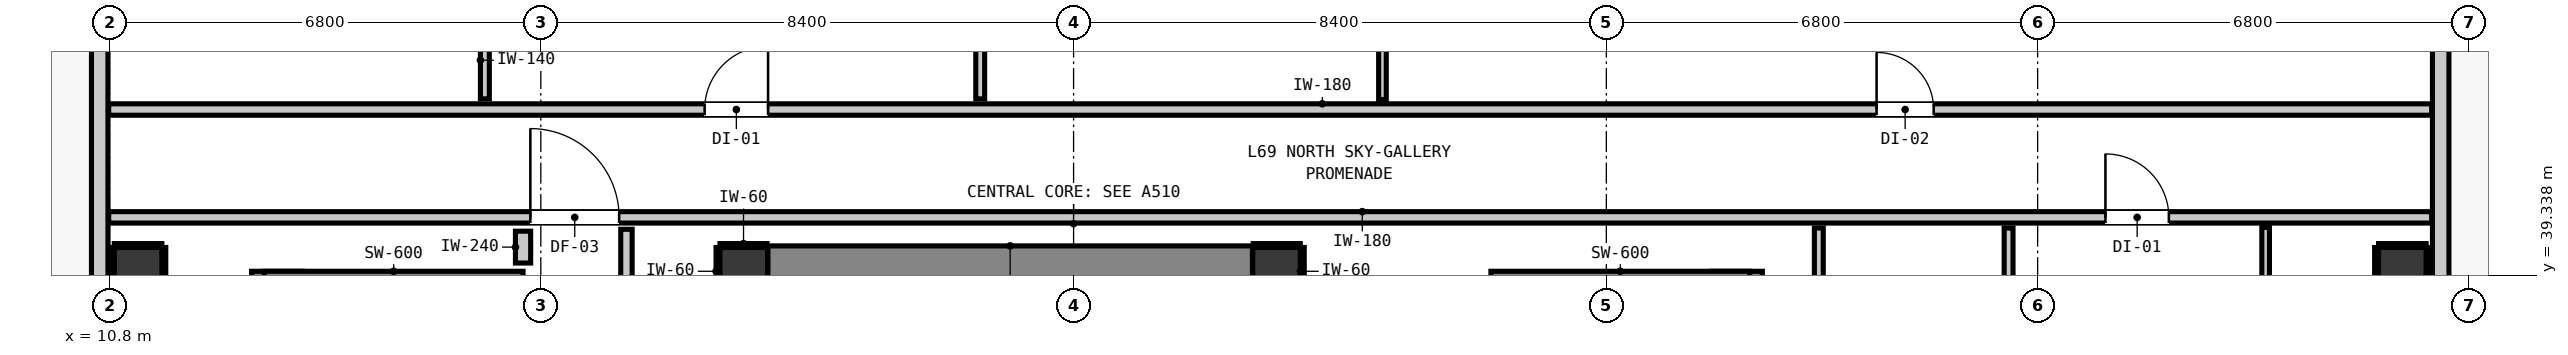
"""IFC4 building model, lengths in metres.
Left out: names, types, materials, properties, quantities, classifications, styles, units other than length and angle.
Written with IfcOpenShell. Run it as: python <this file> out.ifc"""

import sys

from ifc_helpers import new_model, si_unit, direction, frame, frame_2d, origin, origin_2d, place, context, subcontext, project, spatial, rectangle, extrude, element, fill, save


model = new_model("IFC4")
c1 = context("Model", 3, precision=1e-05, world=origin(), true_north=direction((0.0, 1.0)))
c2 = subcontext(c1, "Body", "Model", "MODEL_VIEW")
j1 = project(units=[si_unit("LENGTHUNIT", "METRE"), si_unit("PLANEANGLEUNIT", "RADIAN")], contexts=[c1])
p1 = place(None, origin())
s1 = spatial("IfcSite", under=j1, at=p1, CompositionType="ELEMENT")
p2 = place(p1, origin())
s2 = spatial("IfcBuilding", under=s1, at=p2, CompositionType="ELEMENT")
p3 = place(p2, frame((0.0, 0.0, 237.92)))
s3 = spatial("IfcBuildingStorey", under=s2, at=p3, CompositionType="ELEMENT", Elevation=237.92)
for number, where, z_axis, x_axis in (
    (1, (20.8, 39.4, 0.0), (0.0, 0.0, 1.0), (1.0, 0.0, 0.0)),
    (2, (29.2, 39.4, 0.0), (0.0, 0.0, 1.0), (1.0, 0.0, 0.0)),
):
    element("IfcColumn", number, at=place(p3, frame(where, z_axis=z_axis, x_axis=x_axis)), inside=s3, PredefinedType="COLUMN", context=c2, shape_type="SweptSolid", body=[
        extrude(rectangle(XDim=0.75, YDim=0.75, at=origin_2d()), origin(), (0.0, 0.0, 1.0), 3.32),
    ])
p4 = place(p3, frame((13.44, 31.08, 0.0), z_axis=(0.0, 0.0, 1.0), x_axis=(0.0, 1.0, 0.0)))
e3 = element("IfcWall", 3, at=p4, inside=s3, PredefinedType="SHEAR", context=c2, shape_type="SweptSolid", body=[
    extrude(rectangle(XDim=8.32, YDim=0.8, at=frame_2d((4.16, 0.0))), origin(), (0.0, 0.0, 1.0), 3.32),
])
p5 = place(p3, frame((13.24, 39.1, 0.0), z_axis=(0.0, 0.0, 1.0), x_axis=(1.0, 0.0, 0.0)))
e4 = element("IfcWall", 4, at=p5, inside=s3, PredefinedType="SHEAR", context=c2, shape_type="SweptSolid", body=[
    extrude(rectangle(XDim=4.08, YDim=0.6, at=frame_2d((2.04, 0.0))), origin(), (0.0, 0.0, 1.0), 3.32),
])
p6 = place(p3, frame((36.46, 31.08, 0.0), z_axis=(0.0, 0.0, 1.0), x_axis=(0.0, 1.0, 0.0)))
e5 = element("IfcWall", 5, at=p6, inside=s3, PredefinedType="SHEAR", context=c2, shape_type="SweptSolid", body=[
    extrude(rectangle(XDim=8.32, YDim=0.8, at=frame_2d((4.16, 0.0))), origin(), (0.0, 0.0, 1.0), 3.32),
])
p7 = place(p3, frame((32.58, 39.1, 0.0), z_axis=(0.0, 0.0, 1.0), x_axis=(1.0, 0.0, 0.0)))
e6 = element("IfcWall", 6, at=p7, inside=s3, PredefinedType="SHEAR", context=c2, shape_type="SweptSolid", body=[
    extrude(rectangle(XDim=4.08, YDim=0.6, at=frame_2d((2.04, 0.0))), origin(), (0.0, 0.0, 1.0), 3.32),
])
p8 = place(p3, frame((21.18, 39.4, 0.0), z_axis=(0.0, 0.0, 1.0), x_axis=(1.0, 0.0, 0.0)))
e7 = element("IfcWall", 7, at=p8, inside=s3, PredefinedType="SHEAR", context=c2, shape_type="SweptSolid", body=[
    extrude(rectangle(XDim=7.64, YDim=0.8, at=frame_2d((3.82, 0.0))), origin(), (0.0, 0.0, 1.0), 3.32),
])
for number, where, z_axis, x_axis in (
    (8, (11.25, 39.4, 0.0), (0.0, 0.0, 1.0), (1.0, 0.0, 0.0)),
    (9, (46.95, 39.4, 0.0), (0.0, 0.0, 1.0), (1.0, 0.0, 0.0)),
):
    element("IfcColumn", number, at=place(p3, frame(where, z_axis=z_axis, x_axis=x_axis)), inside=s3, PredefinedType="COLUMN", context=c2, shape_type="SweptSolid", body=[
        extrude(rectangle(XDim=0.75, YDim=0.75, at=origin_2d()), origin(), (0.0, 0.0, 1.0), 3.32),
    ])
p9 = place(p3, frame((10.645, 18.545, 0.0), z_axis=(0.0, 0.0, 1.0), x_axis=(0.0, 1.0, 0.0)))
e10 = element("IfcWall", 10, at=p9, inside=s3, PredefinedType="STANDARD", context=c2, shape_type="SweptSolid", body=[
    extrude(rectangle(XDim=30.31, YDim=0.26, at=frame_2d((15.155, 0.0))), origin(), (0.0, 0.0, 1.0), 3.1),
])
p10 = place(p9, frame((27.695, 0.0, 0.0)))
e11 = element("IfcOpeningElement", 11, at=p10, cuts=e10, PredefinedType="OPENING", context=c2, shape_type="SweptSolid", body=[
    extrude(rectangle(XDim=1.0, YDim=2.15, at=frame_2d((0.5, 1.075))), frame((0.0, 0.14, 0.0), z_axis=(0.0, -1.0, 0.0), x_axis=(1.0, 0.0, 0.0)), (0.0, 0.0, 1.0), 0.28),
])
p11 = place(p9, frame((29.108, 0.0, 0.85)))
e12 = element("IfcOpeningElement", 12, at=p11, cuts=e10, PredefinedType="OPENING", context=c2, shape_type="SweptSolid", body=[
    extrude(rectangle(XDim=0.9, YDim=1.5, at=frame_2d((0.45, 0.75))), frame((0.0, 0.14, 0.0), z_axis=(0.0, -1.0, 0.0), x_axis=(1.0, 0.0, 0.0)), (0.0, 0.0, 1.0), 0.28),
])
p12 = place(p3, frame((47.555, 48.855, 0.0), z_axis=(0.0, 0.0, 1.0), x_axis=(0.0, -1.0, 0.0)))
e13 = element("IfcWall", 13, at=p12, inside=s3, PredefinedType="STANDARD", context=c2, shape_type="SweptSolid", body=[
    extrude(rectangle(XDim=30.31, YDim=0.26, at=frame_2d((15.155, 0.0))), origin(), (0.0, 0.0, 1.0), 3.1),
])
p13 = place(p12, frame((0.91, 0.0, 0.0)))
e14 = element("IfcOpeningElement", 14, at=p13, cuts=e13, PredefinedType="OPENING", context=c2, shape_type="SweptSolid", body=[
    extrude(rectangle(XDim=1.0, YDim=2.15, at=frame_2d((0.5, 1.075))), frame((0.0, 0.14, 0.0), z_axis=(0.0, -1.0, 0.0), x_axis=(1.0, 0.0, 0.0)), (0.0, 0.0, 1.0), 0.28),
])
p14 = place(p12, frame((3.907, 0.0, 0.85)))
e15 = element("IfcOpeningElement", 15, at=p14, cuts=e13, PredefinedType="OPENING", context=c2, shape_type="SweptSolid", body=[
    extrude(rectangle(XDim=1.1, YDim=2.05, at=frame_2d((0.55, 1.025))), frame((0.0, 0.14, 0.0), z_axis=(0.0, -1.0, 0.0), x_axis=(1.0, 0.0, 0.0)), (0.0, 0.0, 1.0), 0.28),
])
p15 = place(p12, frame((21.955, 0.0, 0.85)))
e16 = element("IfcOpeningElement", 16, at=p15, cuts=e13, PredefinedType="OPENING", context=c2, shape_type="SweptSolid", body=[
    extrude(rectangle(XDim=1.1, YDim=2.05, at=frame_2d((0.55, 1.025))), frame((0.0, 0.14, 0.0), z_axis=(0.0, -1.0, 0.0), x_axis=(1.0, 0.0, 0.0)), (0.0, 0.0, 1.0), 0.28),
])
p16 = place(p3, frame((10.787, 40.25, 0.0), z_axis=(0.0, 0.0, 1.0), x_axis=(1.0, 0.0, 0.0)))
e17 = element("IfcWall", 17, at=p16, inside=s3, PredefinedType="PARTITIONING", context=c2, shape_type="SweptSolid", body=[
    extrude(rectangle(XDim=36.626, YDim=0.18, at=frame_2d((18.313, 0.0))), origin(), (0.0, 0.0, 1.0), 3.1),
])
p17 = place(p16, frame((6.648, 0.0, 0.0)))
e18 = element("IfcOpeningElement", 18, at=p17, cuts=e17, PredefinedType="OPENING", context=c2, shape_type="SweptSolid", body=[
    extrude(rectangle(XDim=1.4, YDim=2.15, at=frame_2d((0.7, 1.075))), frame((0.0, 0.1, 0.0), z_axis=(0.0, -1.0, 0.0), x_axis=(1.0, 0.0, 0.0)), (0.0, 0.0, 1.0), 0.2),
])
p18 = place(p16, frame((31.482, 0.0, 0.0)))
e19 = element("IfcOpeningElement", 19, at=p18, cuts=e17, PredefinedType="OPENING", context=c2, shape_type="SweptSolid", body=[
    extrude(rectangle(XDim=1.0, YDim=2.15, at=frame_2d((0.5, 1.075))), frame((0.0, 0.1, 0.0), z_axis=(0.0, -1.0, 0.0), x_axis=(1.0, 0.0, 0.0)), (0.0, 0.0, 1.0), 0.2),
])
p19 = place(p3, frame((10.787, 41.95, 0.0), z_axis=(0.0, 0.0, 1.0), x_axis=(1.0, 0.0, 0.0)))
e20 = element("IfcWall", 20, at=p19, inside=s3, PredefinedType="PARTITIONING", context=c2, shape_type="SweptSolid", body=[
    extrude(rectangle(XDim=36.626, YDim=0.18, at=frame_2d((18.313, 0.0))), origin(), (0.0, 0.0, 1.0), 3.1),
])
p20 = place(p19, frame((9.396, 0.0, 0.0)))
e21 = element("IfcOpeningElement", 21, at=p20, cuts=e20, PredefinedType="OPENING", context=c2, shape_type="SweptSolid", body=[
    extrude(rectangle(XDim=1.0, YDim=2.15, at=frame_2d((0.5, 1.075))), frame((0.0, 0.1, 0.0), z_axis=(0.0, -1.0, 0.0), x_axis=(1.0, 0.0, 0.0)), (0.0, 0.0, 1.0), 0.2),
])
p21 = place(p19, frame((27.874, 0.0, 0.0)))
e22 = element("IfcOpeningElement", 22, at=p21, cuts=e20, PredefinedType="OPENING", context=c2, shape_type="SweptSolid", body=[
    extrude(rectangle(XDim=0.9, YDim=2.1, at=frame_2d((0.45, 1.05))), frame((0.0, 0.1, 0.0), z_axis=(0.0, -1.0, 0.0), x_axis=(1.0, 0.0, 0.0)), (0.0, 0.0, 1.0), 0.2),
])
p22 = place(p3, frame((17.32, 39.53, 0.0), z_axis=(0.0, 0.0, 1.0), x_axis=(0.0, 1.0, 0.0)))
e23 = element("IfcWall", 23, at=p22, inside=s3, PredefinedType="PARTITIONING", context=c2, shape_type="SweptSolid", body=[
    extrude(rectangle(XDim=0.502, YDim=0.24, at=frame_2d((0.251, 0.0))), origin(), (0.0, 0.0, 1.0), 3.1),
])
p23 = place(p3, frame((18.95, 39.058, 0.0), z_axis=(0.0, 0.0, 1.0), x_axis=(0.0, 1.0, 0.0)))
e24 = element("IfcWall", 24, at=p23, inside=s3, PredefinedType="PARTITIONING", context=c2, shape_type="SweptSolid", body=[
    extrude(rectangle(XDim=1.004, YDim=0.18, at=frame_2d((0.502, 0.0))), origin(), (0.0, 0.0, 1.0), 3.1),
])
p24 = place(p3, frame((16.718, 42.118, 0.0), z_axis=(0.0, 0.0, 1.0), x_axis=(0.0, 1.0, 0.0)))
e25 = element("IfcWall", 25, at=p24, inside=s3, PredefinedType="PARTITIONING", context=c2, shape_type="SweptSolid", body=[
    extrude(rectangle(XDim=3.49, YDim=0.14, at=frame_2d((1.745, 0.0))), origin(), (0.0, 0.0, 1.0), 3.1),
])
p25 = place(p24, frame((1.318, 0.0, 0.0)))
e26 = element("IfcOpeningElement", 26, at=p25, cuts=e25, PredefinedType="OPENING", context=c2, shape_type="SweptSolid", body=[
    extrude(rectangle(XDim=0.86, YDim=2.02, at=frame_2d((0.43, 1.01))), frame((0.0, 0.08, 0.0), z_axis=(0.0, -1.0, 0.0), x_axis=(1.0, 0.0, 0.0)), (0.0, 0.0, 1.0), 0.16),
])
p26 = place(p3, frame((24.528, 42.118, 0.0), z_axis=(0.0, 0.0, 1.0), x_axis=(0.0, 1.0, 0.0)))
e27 = element("IfcWall", 27, at=p26, inside=s3, PredefinedType="PARTITIONING", context=c2, shape_type="SweptSolid", body=[
    extrude(rectangle(XDim=8.695, YDim=0.14, at=frame_2d((4.348, 0.0))), origin(), (0.0, 0.0, 1.0), 3.1),
])
p27 = place(p26, frame((1.298, 0.0, 0.0)))
e28 = element("IfcOpeningElement", 28, at=p27, cuts=e27, PredefinedType="OPENING", context=c2, shape_type="SweptSolid", body=[
    extrude(rectangle(XDim=0.9, YDim=2.1, at=frame_2d((0.45, 1.05))), frame((0.0, 0.08, 0.0), z_axis=(0.0, -1.0, 0.0), x_axis=(1.0, 0.0, 0.0)), (0.0, 0.0, 1.0), 0.16),
])
p28 = place(p26, frame((5.697, 0.0, 0.0)))
e29 = element("IfcOpeningElement", 29, at=p28, cuts=e27, PredefinedType="OPENING", context=c2, shape_type="SweptSolid", body=[
    extrude(rectangle(XDim=0.9, YDim=2.1, at=frame_2d((0.45, 1.05))), frame((0.0, 0.08, 0.0), z_axis=(0.0, -1.0, 0.0), x_axis=(1.0, 0.0, 0.0)), (0.0, 0.0, 1.0), 0.16),
])
p29 = place(p3, frame((37.75, 36.218, 0.0), z_axis=(0.0, 0.0, 1.0), x_axis=(0.0, 1.0, 0.0)))
e30 = element("IfcWall", 30, at=p29, inside=s3, PredefinedType="PARTITIONING", context=c2, shape_type="SweptSolid", body=[
    extrude(rectangle(XDim=3.864, YDim=0.14, at=frame_2d((1.932, 0.0))), origin(), (0.0, 0.0, 1.0), 3.1),
])
p30 = place(p3, frame((40.742, 36.218, 0.0), z_axis=(0.0, 0.0, 1.0), x_axis=(0.0, 1.0, 0.0)))
e31 = element("IfcWall", 31, at=p30, inside=s3, PredefinedType="PARTITIONING", context=c2, shape_type="SweptSolid", body=[
    extrude(rectangle(XDim=3.864, YDim=0.14, at=frame_2d((1.932, 0.0))), origin(), (0.0, 0.0, 1.0), 3.1),
])
p31 = place(p30, frame((1.414, 0.0, 0.0)))
e32 = element("IfcOpeningElement", 32, at=p31, cuts=e31, PredefinedType="OPENING", context=c2, shape_type="SweptSolid", body=[
    extrude(rectangle(XDim=0.86, YDim=2.02, at=frame_2d((0.43, 1.01))), frame((0.0, 0.08, 0.0), z_axis=(0.0, -1.0, 0.0), x_axis=(1.0, 0.0, 0.0)), (0.0, 0.0, 1.0), 0.16),
])
p32 = place(p3, frame((30.87, 42.108, 0.0), z_axis=(0.0, 0.0, 1.0), x_axis=(0.0, 1.0, 0.0)))
e33 = element("IfcWall", 33, at=p32, inside=s3, PredefinedType="PARTITIONING", context=c2, shape_type="SweptSolid", body=[
    extrude(rectangle(XDim=3.51, YDim=0.12, at=frame_2d((1.755, 0.0))), origin(), (0.0, 0.0, 1.0), 3.1),
])
p33 = place(p3, frame((44.795, 30.828, 0.0), z_axis=(0.0, 0.0, 1.0), x_axis=(0.0, 1.0, 0.0)))
e34 = element("IfcWall", 34, at=p33, inside=s3, PredefinedType="PARTITIONING", context=c2, shape_type="SweptSolid", body=[
    extrude(rectangle(XDim=9.264, YDim=0.12, at=frame_2d((4.632, 0.0))), origin(), (0.0, 0.0, 1.0), 3.1),
])
p34 = place(p33, frame((4.197, 0.0, 0.0)))
e35 = element("IfcOpeningElement", 35, at=p34, cuts=e34, PredefinedType="OPENING", context=c2, shape_type="SweptSolid", body=[
    extrude(rectangle(XDim=0.9, YDim=2.1, at=frame_2d((0.45, 1.05))), frame((0.0, 0.07, 0.0), z_axis=(0.0, -1.0, 0.0), x_axis=(1.0, 0.0, 0.0)), (0.0, 0.0, 1.0), 0.14),
])
p35 = place(p3, frame((20.425, 39.807, 0.0), z_axis=(0.0, 0.0, 1.0), x_axis=(1.0, 0.0, 0.0)))
e36 = element("IfcWall", 36, at=p35, inside=s3, PredefinedType="PARTITIONING", context=c2, shape_type="SweptSolid", body=[
    extrude(rectangle(XDim=0.742, YDim=0.06, at=frame_2d((0.371, 0.0))), origin(), (0.0, 0.0, 1.0), 1.45),
])
p36 = place(p3, frame((20.393, 39.025, 0.0), z_axis=(0.0, 0.0, 1.0), x_axis=(0.0, 1.0, 0.0)))
e37 = element("IfcWall", 37, at=p36, inside=s3, PredefinedType="PARTITIONING", context=c2, shape_type="SweptSolid", body=[
    extrude(rectangle(XDim=0.75, YDim=0.06, at=frame_2d((0.375, 0.0))), origin(), (0.0, 0.0, 1.0), 1.45),
])
p37 = place(p3, frame((28.833, 39.807, 0.0), z_axis=(0.0, 0.0, 1.0), x_axis=(1.0, 0.0, 0.0)))
e38 = element("IfcWall", 38, at=p37, inside=s3, PredefinedType="PARTITIONING", context=c2, shape_type="SweptSolid", body=[
    extrude(rectangle(XDim=0.742, YDim=0.06, at=frame_2d((0.371, 0.0))), origin(), (0.0, 0.0, 1.0), 1.45),
])
for number, where, z_axis, x_axis in (
    (39, (29.607, 39.025, 0.0), (0.0, 0.0, 1.0), (0.0, 1.0, 0.0)),
    (40, (10.875, 39.807, 0.0), (0.0, 0.0, 1.0), (1.0, 0.0, 0.0)),
    (41, (10.843, 39.025, 0.0), (0.0, 0.0, 1.0), (0.0, 1.0, 0.0)),
    (42, (11.657, 39.025, 0.0), (0.0, 0.0, 1.0), (0.0, 1.0, 0.0)),
    (43, (46.575, 39.807, 0.0), (0.0, 0.0, 1.0), (1.0, 0.0, 0.0)),
    (44, (46.543, 39.025, 0.0), (0.0, 0.0, 1.0), (0.0, 1.0, 0.0)),
    (45, (47.357, 39.025, 0.0), (0.0, 0.0, 1.0), (0.0, 1.0, 0.0)),
):
    element("IfcWall", number, at=place(p3, frame(where, z_axis=z_axis, x_axis=x_axis)), inside=s3, PredefinedType="PARTITIONING", context=c2, shape_type="SweptSolid", body=[
        extrude(rectangle(XDim=0.75, YDim=0.06, at=frame_2d((0.375, 0.0))), origin(), (0.0, 0.0, 1.0), 1.45),
    ])
p38 = place(p17, origin())
e46 = element("IfcDoor", 46, at=p38, inside=s3, OperationType="SINGLE_SWING_LEFT", PredefinedType="DOOR", context=c2, shape_type="SweptSolid", body=[
    extrude(rectangle(XDim=1.4, YDim=2.15, at=frame_2d((0.7, 1.075))), frame((0.0, 0.025, 0.0), z_axis=(0.0, -1.0, 0.0), x_axis=(1.0, 0.0, 0.0)), (0.0, 0.0, 1.0), 0.05),
])
fill(e18, e46)
p39 = place(p20, origin())
e47 = element("IfcDoor", 47, at=p39, inside=s3, OperationType="SINGLE_SWING_RIGHT", PredefinedType="DOOR", context=c2, shape_type="SweptSolid", body=[
    extrude(rectangle(XDim=1.0, YDim=2.15, at=frame_2d((0.5, 1.075))), frame((0.0, 0.025, 0.0), z_axis=(0.0, -1.0, 0.0), x_axis=(1.0, 0.0, 0.0)), (0.0, 0.0, 1.0), 0.05),
])
fill(e21, e47)
p40 = place(p21, origin())
e48 = element("IfcDoor", 48, at=p40, inside=s3, OperationType="SINGLE_SWING_LEFT", PredefinedType="DOOR", context=c2, shape_type="SweptSolid", body=[
    extrude(rectangle(XDim=0.9, YDim=2.1, at=frame_2d((0.45, 1.05))), frame((0.0, 0.025, 0.0), z_axis=(0.0, -1.0, 0.0), x_axis=(1.0, 0.0, 0.0)), (0.0, 0.0, 1.0), 0.05),
])
fill(e22, e48)
p41 = place(p18, origin())
e49 = element("IfcDoor", 49, at=p41, inside=s3, OperationType="SINGLE_SWING_LEFT", PredefinedType="DOOR", context=c2, shape_type="SweptSolid", body=[
    extrude(rectangle(XDim=1.0, YDim=2.15, at=frame_2d((0.5, 1.075))), frame((0.0, 0.025, 0.0), z_axis=(0.0, -1.0, 0.0), x_axis=(1.0, 0.0, 0.0)), (0.0, 0.0, 1.0), 0.05),
])
fill(e19, e49)
save(model, sys.argv[1])
